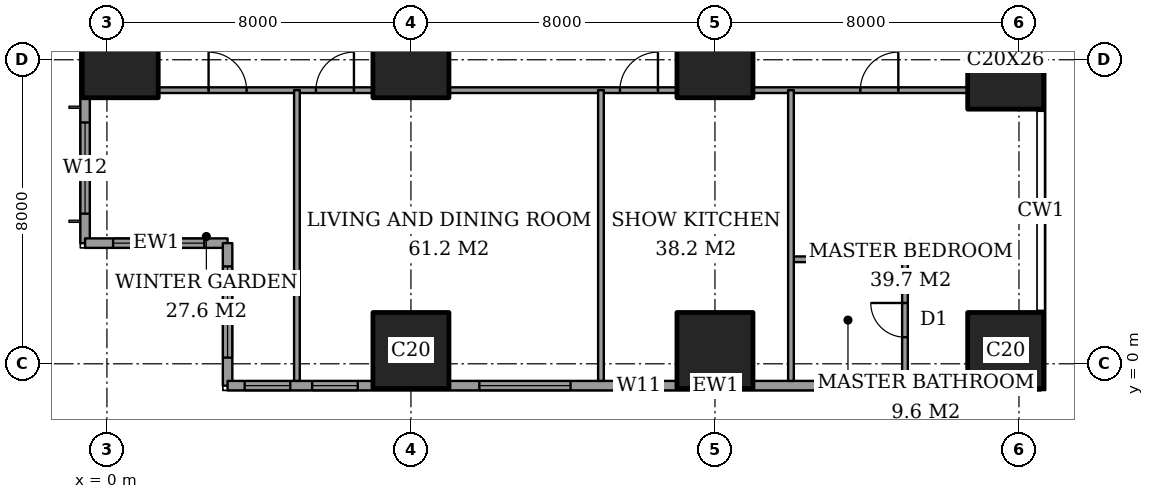
"""IFC4 building model, lengths in metres.
Left out: names, types, materials, properties, quantities, classifications, styles, units other than length and angle.
Written with IfcOpenShell. Run it as: python <this file> out.ifc"""

import sys

from ifc_helpers import new_model, si_unit, direction, frame, frame_2d, origin, origin_2d, place, context, subcontext, project, spatial, rectangle, extrude, element, fill, save


model = new_model("IFC4")
c1 = context("Model", 3, precision=1e-05, world=origin(), true_north=direction((0.0, 1.0)))
c2 = subcontext(c1, "Body", "Model", "MODEL_VIEW")
j1 = project(units=[si_unit("LENGTHUNIT", "METRE"), si_unit("PLANEANGLEUNIT", "RADIAN")], contexts=[c1])
p1 = place(None, origin())
s1 = spatial("IfcSite", under=j1, at=p1, CompositionType="ELEMENT")
p2 = place(p1, origin())
s2 = spatial("IfcBuilding", under=s1, at=p2, CompositionType="ELEMENT")
p3 = place(p2, frame((0.0, 0.0, 164.6)))
s3 = spatial("IfcBuildingStorey", under=s2, at=p3, CompositionType="ELEMENT", Elevation=164.6)
for number, where, z_axis, x_axis in (
    (1, (0.35, 8.0, 0.0), (0.0, 0.0, 1.0), (1.0, 0.0, 0.0)),
    (2, (8.0, 0.35, 0.0), (0.0, 0.0, 1.0), (1.0, 0.0, 0.0)),
    (3, (8.0, 8.0, 0.0), (0.0, 0.0, 1.0), (1.0, 0.0, 0.0)),
    (4, (16.0, 0.35, 0.0), (0.0, 0.0, 1.0), (1.0, 0.0, 0.0)),
    (5, (16.0, 8.0, 0.0), (0.0, 0.0, 1.0), (1.0, 0.0, 0.0)),
    (6, (23.65, 0.35, 0.0), (0.0, 0.0, 1.0), (1.0, 0.0, 0.0)),
):
    element("IfcColumn", number, at=place(p3, frame(where, z_axis=z_axis, x_axis=x_axis)), inside=s3, PredefinedType="COLUMN", context=c2, shape_type="SweptSolid", body=[
        extrude(rectangle(XDim=2.0, YDim=2.0, at=origin_2d()), origin(), (0.0, 0.0, 1.0), 3.6),
    ])
p4 = place(p3, frame((23.65, 8.0, 0.0), z_axis=(0.0, 0.0, 1.0), x_axis=(1.0, 0.0, 0.0)))
e7 = element("IfcColumn", 7, at=p4, inside=s3, PredefinedType="COLUMN", context=c2, shape_type="SweptSolid", body=[
    extrude(rectangle(XDim=2.0, YDim=2.6, at=origin_2d()), origin(), (0.0, 0.0, 1.0), 3.6),
])
p5 = place(p3, frame((-0.575, 44.825, 0.0), z_axis=(0.0, 0.0, 1.0), x_axis=(0.0, -1.0, 0.0)))
e8 = element("IfcWall", 8, at=p5, inside=s3, PredefinedType="SOLIDWALL", context=c2, shape_type="SweptSolid", body=[
    extrude(rectangle(XDim=41.65, YDim=0.25, at=frame_2d((20.825, 0.0))), origin(), (0.0, 0.0, 1.0), 3.6),
])
p6 = place(p5, frame((0.775, 0.0, 0.4)))
e9 = element("IfcOpeningElement", 9, at=p6, cuts=e8, PredefinedType="OPENING", context=c2, shape_type="SweptSolid", body=[
    extrude(rectangle(XDim=2.4, YDim=2.2, at=frame_2d((1.2, 1.1))), frame((0.0, 0.135, 0.0), z_axis=(0.0, -1.0, 0.0), x_axis=(1.0, 0.0, 0.0)), (0.0, 0.0, 1.0), 0.27),
])
p7 = place(p5, frame((6.1, 0.0, 0.4)))
e10 = element("IfcOpeningElement", 10, at=p7, cuts=e8, PredefinedType="OPENING", context=c2, shape_type="SweptSolid", body=[
    extrude(rectangle(XDim=1.2, YDim=2.2, at=frame_2d((0.6, 1.1))), frame((0.0, 0.135, 0.0), z_axis=(0.0, -1.0, 0.0), x_axis=(1.0, 0.0, 0.0)), (0.0, 0.0, 1.0), 0.27),
])
p8 = place(p5, frame((8.425, 0.0, 0.4)))
e11 = element("IfcOpeningElement", 11, at=p8, cuts=e8, PredefinedType="OPENING", context=c2, shape_type="SweptSolid", body=[
    extrude(rectangle(XDim=2.4, YDim=2.2, at=frame_2d((1.2, 1.1))), frame((0.0, 0.135, 0.0), z_axis=(0.0, -1.0, 0.0), x_axis=(1.0, 0.0, 0.0)), (0.0, 0.0, 1.0), 0.27),
])
p9 = place(p5, frame((15.625, 0.0, 0.4)))
e12 = element("IfcOpeningElement", 12, at=p9, cuts=e8, PredefinedType="OPENING", context=c2, shape_type="SweptSolid", body=[
    extrude(rectangle(XDim=2.4, YDim=2.2, at=frame_2d((1.2, 1.1))), frame((0.0, 0.135, 0.0), z_axis=(0.0, -1.0, 0.0), x_axis=(1.0, 0.0, 0.0)), (0.0, 0.0, 1.0), 0.27),
])
p10 = place(p5, frame((23.625, 0.0, 0.4)))
e13 = element("IfcOpeningElement", 13, at=p10, cuts=e8, PredefinedType="OPENING", context=c2, shape_type="SweptSolid", body=[
    extrude(rectangle(XDim=2.4, YDim=2.2, at=frame_2d((1.2, 1.1))), frame((0.0, 0.135, 0.0), z_axis=(0.0, -1.0, 0.0), x_axis=(1.0, 0.0, 0.0)), (0.0, 0.0, 1.0), 0.27),
])
p11 = place(p5, frame((30.825, 0.0, 0.4)))
e14 = element("IfcOpeningElement", 14, at=p11, cuts=e8, PredefinedType="OPENING", context=c2, shape_type="SweptSolid", body=[
    extrude(rectangle(XDim=2.4, YDim=2.2, at=frame_2d((1.2, 1.1))), frame((0.0, 0.135, 0.0), z_axis=(0.0, -1.0, 0.0), x_axis=(1.0, 0.0, 0.0)), (0.0, 0.0, 1.0), 0.27),
])
p12 = place(p5, frame((34.5, 0.0, 0.4)))
e15 = element("IfcOpeningElement", 15, at=p12, cuts=e8, PredefinedType="OPENING", context=c2, shape_type="SweptSolid", body=[
    extrude(rectangle(XDim=1.2, YDim=2.2, at=frame_2d((0.6, 1.1))), frame((0.0, 0.135, 0.0), z_axis=(0.0, -1.0, 0.0), x_axis=(1.0, 0.0, 0.0)), (0.0, 0.0, 1.0), 0.27),
])
p13 = place(p5, frame((38.475, 0.0, 0.4)))
e16 = element("IfcOpeningElement", 16, at=p13, cuts=e8, PredefinedType="OPENING", context=c2, shape_type="SweptSolid", body=[
    extrude(rectangle(XDim=2.4, YDim=2.2, at=frame_2d((1.2, 1.1))), frame((0.0, 0.135, 0.0), z_axis=(0.0, -1.0, 0.0), x_axis=(1.0, 0.0, 0.0)), (0.0, 0.0, 1.0), 0.27),
])
p14 = place(p3, frame((-0.575, 3.175, 0.0), z_axis=(0.0, 0.0, 1.0), x_axis=(1.0, 0.0, 0.0)))
e17 = element("IfcWall", 17, at=p14, inside=s3, PredefinedType="SOLIDWALL", context=c2, shape_type="SweptSolid", body=[
    extrude(rectangle(XDim=3.75, YDim=0.25, at=frame_2d((1.875, 0.0))), origin(), (0.0, 0.0, 1.0), 3.6),
])
p15 = place(p14, frame((0.738, 0.0, 0.4)))
e18 = element("IfcOpeningElement", 18, at=p15, cuts=e17, PredefinedType="OPENING", context=c2, shape_type="SweptSolid", body=[
    extrude(rectangle(XDim=2.4, YDim=2.2, at=frame_2d((1.2, 1.1))), frame((0.0, 0.135, 0.0), z_axis=(0.0, -1.0, 0.0), x_axis=(1.0, 0.0, 0.0)), (0.0, 0.0, 1.0), 0.27),
])
p16 = place(p3, frame((3.175, 3.175, 0.0), z_axis=(0.0, 0.0, 1.0), x_axis=(0.0, -1.0, 0.0)))
e19 = element("IfcWall", 19, at=p16, inside=s3, PredefinedType="SOLIDWALL", context=c2, shape_type="SweptSolid", body=[
    extrude(rectangle(XDim=3.75, YDim=0.25, at=frame_2d((1.875, 0.0))), origin(), (0.0, 0.0, 1.0), 3.6),
])
p17 = place(p16, frame((0.613, 0.0, 0.4)))
e20 = element("IfcOpeningElement", 20, at=p17, cuts=e19, PredefinedType="OPENING", context=c2, shape_type="SweptSolid", body=[
    extrude(rectangle(XDim=2.4, YDim=2.2, at=frame_2d((1.2, 1.1))), frame((0.0, 0.135, 0.0), z_axis=(0.0, -1.0, 0.0), x_axis=(1.0, 0.0, 0.0)), (0.0, 0.0, 1.0), 0.27),
])
p18 = place(p3, frame((3.175, -0.575, 0.0), z_axis=(0.0, 0.0, 1.0), x_axis=(1.0, 0.0, 0.0)))
e21 = element("IfcWall", 21, at=p18, inside=s3, PredefinedType="SOLIDWALL", context=c2, shape_type="SweptSolid", body=[
    extrude(rectangle(XDim=21.4, YDim=0.25, at=frame_2d((10.7, 0.0))), origin(), (0.0, 0.0, 1.0), 3.6),
])
p19 = place(p18, frame((0.45, 0.0, 0.4)))
e22 = element("IfcOpeningElement", 22, at=p19, cuts=e21, PredefinedType="OPENING", context=c2, shape_type="SweptSolid", body=[
    extrude(rectangle(XDim=1.2, YDim=2.2, at=frame_2d((0.6, 1.1))), frame((0.0, 0.135, 0.0), z_axis=(0.0, -1.0, 0.0), x_axis=(1.0, 0.0, 0.0)), (0.0, 0.0, 1.0), 0.27),
])
p20 = place(p18, frame((2.225, 0.0, 0.4)))
e23 = element("IfcOpeningElement", 23, at=p20, cuts=e21, PredefinedType="OPENING", context=c2, shape_type="SweptSolid", body=[
    extrude(rectangle(XDim=1.2, YDim=2.2, at=frame_2d((0.6, 1.1))), frame((0.0, 0.135, 0.0), z_axis=(0.0, -1.0, 0.0), x_axis=(1.0, 0.0, 0.0)), (0.0, 0.0, 1.0), 0.27),
])
p21 = place(p18, frame((6.625, 0.0, 0.4)))
e24 = element("IfcOpeningElement", 24, at=p21, cuts=e21, PredefinedType="OPENING", context=c2, shape_type="SweptSolid", body=[
    extrude(rectangle(XDim=2.4, YDim=2.2, at=frame_2d((1.2, 1.1))), frame((0.0, 0.135, 0.0), z_axis=(0.0, -1.0, 0.0), x_axis=(1.0, 0.0, 0.0)), (0.0, 0.0, 1.0), 0.27),
])
p22 = place(p18, frame((10.225, 0.0, 0.4)))
e25 = element("IfcOpeningElement", 25, at=p22, cuts=e21, PredefinedType="OPENING", context=c2, shape_type="SweptSolid", body=[
    extrude(rectangle(XDim=1.2, YDim=2.2, at=frame_2d((0.6, 1.1))), frame((0.0, 0.135, 0.0), z_axis=(0.0, -1.0, 0.0), x_axis=(1.0, 0.0, 0.0)), (0.0, 0.0, 1.0), 0.27),
])
p23 = place(p18, frame((15.725, 0.0, 0.4)))
e26 = element("IfcOpeningElement", 26, at=p23, cuts=e21, PredefinedType="OPENING", context=c2, shape_type="SweptSolid", body=[
    extrude(rectangle(XDim=1.2, YDim=2.2, at=frame_2d((0.6, 1.1))), frame((0.0, 0.135, 0.0), z_axis=(0.0, -1.0, 0.0), x_axis=(1.0, 0.0, 0.0)), (0.0, 0.0, 1.0), 0.27),
])
p24 = place(p18, frame((18.125, 0.0, 0.4)))
e27 = element("IfcOpeningElement", 27, at=p24, cuts=e21, PredefinedType="OPENING", context=c2, shape_type="SweptSolid", body=[
    extrude(rectangle(XDim=1.2, YDim=2.2, at=frame_2d((0.6, 1.1))), frame((0.0, 0.135, 0.0), z_axis=(0.0, -1.0, 0.0), x_axis=(1.0, 0.0, 0.0)), (0.0, 0.0, 1.0), 0.27),
])
p25 = place(p3, frame((18.0, 2.75, 0.0), z_axis=(0.0, 0.0, 1.0), x_axis=(1.0, 0.0, 0.0)))
e28 = element("IfcWall", 28, at=p25, inside=s3, PredefinedType="PARTITIONING", context=c2, shape_type="SweptSolid", body=[
    extrude(rectangle(XDim=3.0, YDim=0.15, at=frame_2d((1.5, 0.0))), origin(), (0.0, 0.0, 1.0), 3.35),
])
p26 = place(p3, frame((1.35, 7.2, 0.0), z_axis=(0.0, 0.0, 1.0), x_axis=(1.0, 0.0, 0.0)))
e29 = element("IfcWall", 29, at=p26, inside=s3, PredefinedType="PARTITIONING", context=c2, shape_type="SweptSolid", body=[
    extrude(rectangle(XDim=5.65, YDim=0.15, at=frame_2d((2.825, 0.0))), origin(), (0.0, 0.0, 1.0), 3.35),
])
p27 = place(p26, frame((1.325, 0.0, 0.0)))
e30 = element("IfcOpeningElement", 30, at=p27, cuts=e29, PredefinedType="OPENING", context=c2, shape_type="SweptSolid", body=[
    extrude(rectangle(XDim=1.0, YDim=2.1, at=frame_2d((0.5, 1.05))), frame((0.0, 0.085, 0.0), z_axis=(0.0, -1.0, 0.0), x_axis=(1.0, 0.0, 0.0)), (0.0, 0.0, 1.0), 0.17),
])
p28 = place(p26, frame((4.15, 0.0, 0.0)))
e31 = element("IfcOpeningElement", 31, at=p28, cuts=e29, PredefinedType="OPENING", context=c2, shape_type="SweptSolid", body=[
    extrude(rectangle(XDim=1.0, YDim=2.1, at=frame_2d((0.5, 1.05))), frame((0.0, 0.085, 0.0), z_axis=(0.0, -1.0, 0.0), x_axis=(1.0, 0.0, 0.0)), (0.0, 0.0, 1.0), 0.17),
])
p29 = place(p3, frame((9.0, 7.2, 0.0), z_axis=(0.0, 0.0, 1.0), x_axis=(1.0, 0.0, 0.0)))
e32 = element("IfcWall", 32, at=p29, inside=s3, PredefinedType="PARTITIONING", context=c2, shape_type="SweptSolid", body=[
    extrude(rectangle(XDim=6.0, YDim=0.15, at=frame_2d((3.0, 0.0))), origin(), (0.0, 0.0, 1.0), 3.35),
])
p30 = place(p29, frame((4.5, 0.0, 0.0)))
e33 = element("IfcOpeningElement", 33, at=p30, cuts=e32, PredefinedType="OPENING", context=c2, shape_type="SweptSolid", body=[
    extrude(rectangle(XDim=1.0, YDim=2.1, at=frame_2d((0.5, 1.05))), frame((0.0, 0.085, 0.0), z_axis=(0.0, -1.0, 0.0), x_axis=(1.0, 0.0, 0.0)), (0.0, 0.0, 1.0), 0.17),
])
p31 = place(p3, frame((17.0, 7.2, 0.0), z_axis=(0.0, 0.0, 1.0), x_axis=(1.0, 0.0, 0.0)))
e34 = element("IfcWall", 34, at=p31, inside=s3, PredefinedType="PARTITIONING", context=c2, shape_type="SweptSolid", body=[
    extrude(rectangle(XDim=5.65, YDim=0.15, at=frame_2d((2.825, 0.0))), origin(), (0.0, 0.0, 1.0), 3.35),
])
p32 = place(p31, frame((2.825, 0.0, 0.0)))
e35 = element("IfcOpeningElement", 35, at=p32, cuts=e34, PredefinedType="OPENING", context=c2, shape_type="SweptSolid", body=[
    extrude(rectangle(XDim=1.0, YDim=2.1, at=frame_2d((0.5, 1.05))), frame((0.0, 0.085, 0.0), z_axis=(0.0, -1.0, 0.0), x_axis=(1.0, 0.0, 0.0)), (0.0, 0.0, 1.0), 0.17),
])
for number, where, z_axis, x_axis in (
    (36, (5.0, -0.45, 0.0), (0.0, 0.0, 1.0), (0.0, 1.0, 0.0)),
    (37, (13.0, -0.45, 0.0), (0.0, 0.0, 1.0), (0.0, 1.0, 0.0)),
    (38, (18.0, -0.45, 0.0), (0.0, 0.0, 1.0), (0.0, 1.0, 0.0)),
):
    element("IfcWall", number, at=place(p3, frame(where, z_axis=z_axis, x_axis=x_axis)), inside=s3, PredefinedType="PARTITIONING", context=c2, shape_type="SweptSolid", body=[
        extrude(rectangle(XDim=7.65, YDim=0.15, at=frame_2d((3.825, 0.0))), origin(), (0.0, 0.0, 1.0), 3.35),
    ])
p33 = place(p3, frame((21.0, -0.45, 0.0), z_axis=(0.0, 0.0, 1.0), x_axis=(0.0, 1.0, 0.0)))
e39 = element("IfcWall", 39, at=p33, inside=s3, PredefinedType="PARTITIONING", context=c2, shape_type="SweptSolid", body=[
    extrude(rectangle(XDim=3.2, YDim=0.15, at=frame_2d((1.6, 0.0))), origin(), (0.0, 0.0, 1.0), 3.35),
])
p34 = place(p33, frame((1.15, 0.0, 0.0)))
e40 = element("IfcOpeningElement", 40, at=p34, cuts=e39, PredefinedType="OPENING", context=c2, shape_type="SweptSolid", body=[
    extrude(rectangle(XDim=0.9, YDim=2.1, at=frame_2d((0.45, 1.05))), frame((0.0, 0.085, 0.0), z_axis=(0.0, -1.0, 0.0), x_axis=(1.0, 0.0, 0.0)), (0.0, 0.0, 1.0), 0.17),
])
p35 = place(p13, origin())
e41 = element("IfcWindow", 41, at=p35, inside=s3, PartitioningType="SINGLE_PANEL", PredefinedType="WINDOW", context=c2, shape_type="SweptSolid", body=[
    extrude(rectangle(XDim=2.4, YDim=2.2, at=frame_2d((1.2, 1.1))), frame((0.0, 0.03, 0.0), z_axis=(0.0, -1.0, 0.0), x_axis=(1.0, 0.0, 0.0)), (0.0, 0.0, 1.0), 0.06),
])
fill(e16, e41)
p36 = place(p15, origin())
e42 = element("IfcWindow", 42, at=p36, inside=s3, PartitioningType="SINGLE_PANEL", PredefinedType="WINDOW", context=c2, shape_type="SweptSolid", body=[
    extrude(rectangle(XDim=2.4, YDim=2.2, at=frame_2d((1.2, 1.1))), frame((0.0, 0.03, 0.0), z_axis=(0.0, -1.0, 0.0), x_axis=(1.0, 0.0, 0.0)), (0.0, 0.0, 1.0), 0.06),
])
fill(e18, e42)
p37 = place(p17, origin())
e43 = element("IfcWindow", 43, at=p37, inside=s3, PartitioningType="SINGLE_PANEL", PredefinedType="WINDOW", context=c2, shape_type="SweptSolid", body=[
    extrude(rectangle(XDim=2.4, YDim=2.2, at=frame_2d((1.2, 1.1))), frame((0.0, 0.03, 0.0), z_axis=(0.0, -1.0, 0.0), x_axis=(1.0, 0.0, 0.0)), (0.0, 0.0, 1.0), 0.06),
])
fill(e20, e43)
p38 = place(p19, origin())
e44 = element("IfcWindow", 44, at=p38, inside=s3, PartitioningType="SINGLE_PANEL", PredefinedType="WINDOW", context=c2, shape_type="SweptSolid", body=[
    extrude(rectangle(XDim=1.2, YDim=2.2, at=frame_2d((0.6, 1.1))), frame((0.0, 0.03, 0.0), z_axis=(0.0, -1.0, 0.0), x_axis=(1.0, 0.0, 0.0)), (0.0, 0.0, 1.0), 0.06),
])
fill(e22, e44)
p39 = place(p20, origin())
e45 = element("IfcWindow", 45, at=p39, inside=s3, PartitioningType="SINGLE_PANEL", PredefinedType="WINDOW", context=c2, shape_type="SweptSolid", body=[
    extrude(rectangle(XDim=1.2, YDim=2.2, at=frame_2d((0.6, 1.1))), frame((0.0, 0.03, 0.0), z_axis=(0.0, -1.0, 0.0), x_axis=(1.0, 0.0, 0.0)), (0.0, 0.0, 1.0), 0.06),
])
fill(e23, e45)
p40 = place(p21, origin())
e46 = element("IfcWindow", 46, at=p40, inside=s3, PartitioningType="SINGLE_PANEL", PredefinedType="WINDOW", context=c2, shape_type="SweptSolid", body=[
    extrude(rectangle(XDim=2.4, YDim=2.2, at=frame_2d((1.2, 1.1))), frame((0.0, 0.03, 0.0), z_axis=(0.0, -1.0, 0.0), x_axis=(1.0, 0.0, 0.0)), (0.0, 0.0, 1.0), 0.06),
])
fill(e24, e46)
p41 = place(p22, origin())
e47 = element("IfcWindow", 47, at=p41, inside=s3, PartitioningType="SINGLE_PANEL", PredefinedType="WINDOW", context=c2, shape_type="SweptSolid", body=[
    extrude(rectangle(XDim=1.2, YDim=2.2, at=frame_2d((0.6, 1.1))), frame((0.0, 0.03, 0.0), z_axis=(0.0, -1.0, 0.0), x_axis=(1.0, 0.0, 0.0)), (0.0, 0.0, 1.0), 0.06),
])
fill(e25, e47)
p42 = place(p23, origin())
e48 = element("IfcWindow", 48, at=p42, inside=s3, PartitioningType="SINGLE_PANEL", PredefinedType="WINDOW", context=c2, shape_type="SweptSolid", body=[
    extrude(rectangle(XDim=1.2, YDim=2.2, at=frame_2d((0.6, 1.1))), frame((0.0, 0.03, 0.0), z_axis=(0.0, -1.0, 0.0), x_axis=(1.0, 0.0, 0.0)), (0.0, 0.0, 1.0), 0.06),
])
fill(e26, e48)
p43 = place(p24, origin())
e49 = element("IfcWindow", 49, at=p43, inside=s3, PartitioningType="SINGLE_PANEL", PredefinedType="WINDOW", context=c2, shape_type="SweptSolid", body=[
    extrude(rectangle(XDim=1.2, YDim=2.2, at=frame_2d((0.6, 1.1))), frame((0.0, 0.03, 0.0), z_axis=(0.0, -1.0, 0.0), x_axis=(1.0, 0.0, 0.0)), (0.0, 0.0, 1.0), 0.06),
])
fill(e27, e49)
p44 = place(p27, origin())
e50 = element("IfcDoor", 50, at=p44, inside=s3, OperationType="SINGLE_SWING_RIGHT", PredefinedType="DOOR", context=c2, shape_type="SweptSolid", body=[
    extrude(rectangle(XDim=1.0, YDim=2.1, at=frame_2d((0.5, 1.05))), frame((0.0, 0.025, 0.0), z_axis=(0.0, -1.0, 0.0), x_axis=(1.0, 0.0, 0.0)), (0.0, 0.0, 1.0), 0.05),
])
fill(e30, e50)
p45 = place(p28, origin())
e51 = element("IfcDoor", 51, at=p45, inside=s3, OperationType="SINGLE_SWING_LEFT", PredefinedType="DOOR", context=c2, shape_type="SweptSolid", body=[
    extrude(rectangle(XDim=1.0, YDim=2.1, at=frame_2d((0.5, 1.05))), frame((0.0, 0.025, 0.0), z_axis=(0.0, -1.0, 0.0), x_axis=(1.0, 0.0, 0.0)), (0.0, 0.0, 1.0), 0.05),
])
fill(e31, e51)
p46 = place(p30, origin())
e52 = element("IfcDoor", 52, at=p46, inside=s3, OperationType="SINGLE_SWING_LEFT", PredefinedType="DOOR", context=c2, shape_type="SweptSolid", body=[
    extrude(rectangle(XDim=1.0, YDim=2.1, at=frame_2d((0.5, 1.05))), frame((0.0, 0.025, 0.0), z_axis=(0.0, -1.0, 0.0), x_axis=(1.0, 0.0, 0.0)), (0.0, 0.0, 1.0), 0.05),
])
fill(e33, e52)
p47 = place(p34, origin())
e53 = element("IfcDoor", 53, at=p47, inside=s3, OperationType="SINGLE_SWING_LEFT", PredefinedType="DOOR", context=c2, shape_type="SweptSolid", body=[
    extrude(rectangle(XDim=0.9, YDim=2.1, at=frame_2d((0.45, 1.05))), frame((0.0, 0.025, 0.0), z_axis=(0.0, -1.0, 0.0), x_axis=(1.0, 0.0, 0.0)), (0.0, 0.0, 1.0), 0.05),
])
fill(e40, e53)
p48 = place(p32, origin())
e54 = element("IfcDoor", 54, at=p48, inside=s3, OperationType="SINGLE_SWING_LEFT", PredefinedType="DOOR", context=c2, shape_type="SweptSolid", body=[
    extrude(rectangle(XDim=1.0, YDim=2.1, at=frame_2d((0.5, 1.05))), frame((0.0, 0.025, 0.0), z_axis=(0.0, -1.0, 0.0), x_axis=(1.0, 0.0, 0.0)), (0.0, 0.0, 1.0), 0.05),
])
fill(e35, e54)
save(model, sys.argv[1])
